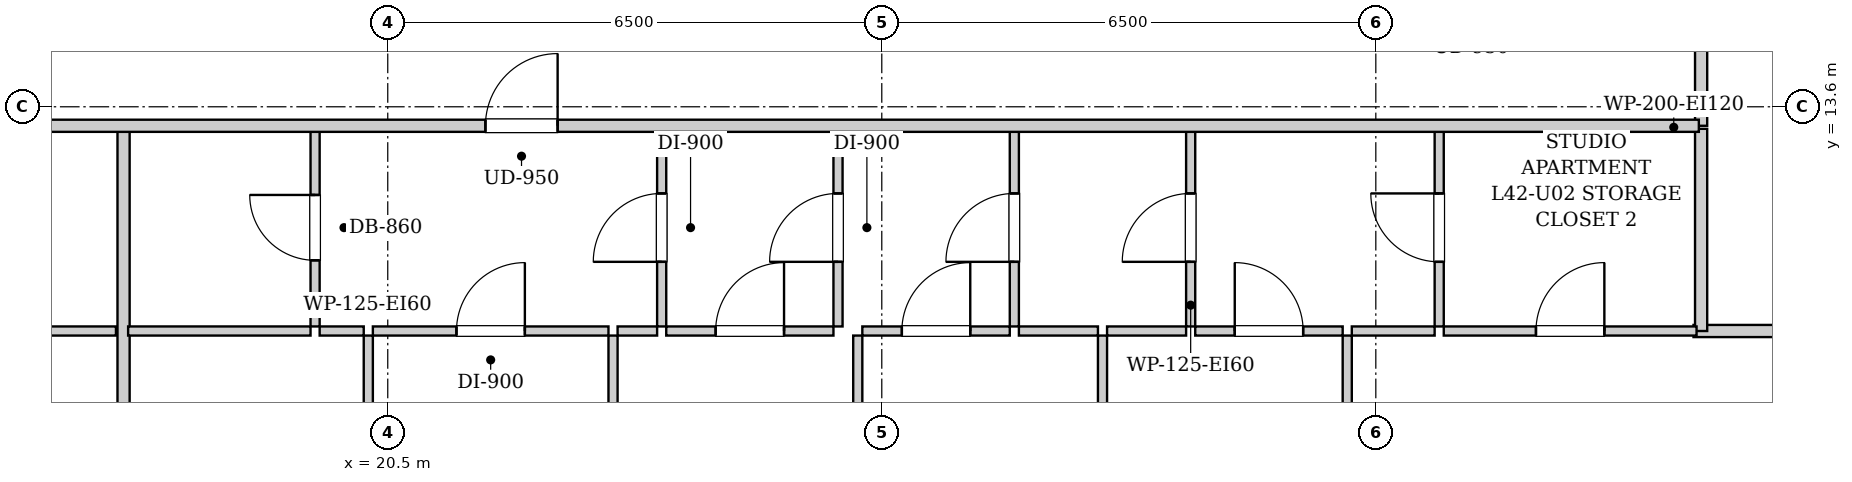
"""IFC4 building model, lengths in metres.
Left out: names, types, materials, properties, quantities, classifications, styles, units other than length and angle.
Written with IfcOpenShell. Run it as: python <this file> out.ifc"""

import sys

from ifc_helpers import new_model, si_unit, direction, frame, frame_2d, origin, place, context, subcontext, project, spatial, rectangle, extrude, element, fill, save


model = new_model("IFC4")
c1 = context("Model", 3, precision=1e-05, world=origin(), true_north=direction((0.0, 1.0)))
c2 = subcontext(c1, "Body", "Model", "MODEL_VIEW")
j1 = project(units=[si_unit("LENGTHUNIT", "METRE"), si_unit("PLANEANGLEUNIT", "RADIAN")], contexts=[c1])
p1 = place(None, origin())
s1 = spatial("IfcSite", under=j1, at=p1, CompositionType="ELEMENT")
p2 = place(p1, origin())
s2 = spatial("IfcBuilding", under=s1, at=p2, CompositionType="ELEMENT")
p3 = place(p2, frame((0.0, 0.0, 147.15)))
s3 = spatial("IfcBuildingStorey", under=s2, at=p3, CompositionType="ELEMENT", Elevation=147.15)
p4 = place(p3, frame((37.78, 13.35, 0.0), z_axis=(0.0, 0.0, 1.0), x_axis=(0.0, 1.0, 0.0)))
e1 = element("IfcWall", 1, at=p4, inside=s3, PredefinedType="PARTITIONING", context=c2, shape_type="SweptSolid", body=[
    extrude(rectangle(XDim=1.74, YDim=0.16, at=frame_2d((0.87, 0.0))), origin(), (0.0, 0.0, 1.0), 2.99),
])
p5 = place(p3, frame((12.253, 10.65, 0.0), z_axis=(0.0, 0.0, 1.0), x_axis=(1.0, 0.0, 0.0)))
e2 = element("IfcWall", 2, at=p5, inside=s3, PredefinedType="PARTITIONING", context=c2, shape_type="SweptSolid", body=[
    extrude(rectangle(XDim=4.671, YDim=0.12, at=frame_2d((2.335, 0.0))), origin(), (0.0, 0.0, 1.0), 2.99),
])
p6 = place(p5, frame((1.885, 0.0, 0.0)))
e3 = element("IfcOpeningElement", 3, at=p6, cuts=e2, PredefinedType="OPENING", context=c2, shape_type="SweptSolid", body=[
    extrude(rectangle(XDim=0.9, YDim=2.05, at=frame_2d((0.45, 1.025))), frame((0.0, 0.07, 0.0), z_axis=(0.0, -1.0, 0.0), x_axis=(1.0, 0.0, 0.0)), (0.0, 0.0, 1.0), 0.14),
])
p7 = place(p3, frame((37.68, 10.65, 0.0), z_axis=(0.0, 0.0, 1.0), x_axis=(1.0, 0.0, 0.0)))
e4 = element("IfcWall", 4, at=p7, inside=s3, PredefinedType="PARTITIONING", context=c2, shape_type="SweptSolid", body=[
    extrude(rectangle(XDim=2.34, YDim=0.16, at=frame_2d((1.17, 0.0))), origin(), (0.0, 0.0, 1.0), 2.99),
])
p8 = place(p3, frame((37.78, 10.65, 0.0), z_axis=(0.0, 0.0, 1.0), x_axis=(0.0, 1.0, 0.0)))
e5 = element("IfcWall", 5, at=p8, inside=s3, PredefinedType="PARTITIONING", context=c2, shape_type="SweptSolid", body=[
    extrude(rectangle(XDim=2.66, YDim=0.16, at=frame_2d((1.33, 0.0))), origin(), (0.0, 0.0, 1.0), 2.99),
])
p9 = place(p3, frame((17.024, 6.06, 0.0), z_axis=(0.0, 0.0, 1.0), x_axis=(0.0, 1.0, 0.0)))
e6 = element("IfcWall", 6, at=p9, inside=s3, PredefinedType="PARTITIONING", context=c2, shape_type="SweptSolid", body=[
    extrude(rectangle(XDim=7.25, YDim=0.16, at=frame_2d((3.625, 0.0))), origin(), (0.0, 0.0, 1.0), 2.99),
])
p10 = place(p3, frame((19.544, 10.71, 0.0), z_axis=(0.0, 0.0, 1.0), x_axis=(0.0, 1.0, 0.0)))
e7 = element("IfcWall", 7, at=p10, inside=s3, PredefinedType="PARTITIONING", context=c2, shape_type="SweptSolid", body=[
    extrude(rectangle(XDim=2.6, YDim=0.12, at=frame_2d((1.3, 0.0))), origin(), (0.0, 0.0, 1.0), 2.99),
])
p11 = place(p10, frame((0.87, 0.0, 0.0)))
e8 = element("IfcOpeningElement", 8, at=p11, cuts=e7, PredefinedType="OPENING", context=c2, shape_type="SweptSolid", body=[
    extrude(rectangle(XDim=0.86, YDim=2.05, at=frame_2d((0.43, 1.025))), frame((0.0, 0.07, 0.0), z_axis=(0.0, -1.0, 0.0), x_axis=(1.0, 0.0, 0.0)), (0.0, 0.0, 1.0), 0.14),
])
p12 = place(p3, frame((17.084, 10.65, 0.0), z_axis=(0.0, 0.0, 1.0), x_axis=(1.0, 0.0, 0.0)))
e9 = element("IfcWall", 9, at=p12, inside=s3, PredefinedType="PARTITIONING", context=c2, shape_type="SweptSolid", body=[
    extrude(rectangle(XDim=2.4, YDim=0.12, at=frame_2d((1.2, 0.0))), origin(), (0.0, 0.0, 1.0), 2.99),
])
p13 = place(p3, frame((24.104, 10.71, 0.0), z_axis=(0.0, 0.0, 1.0), x_axis=(0.0, 1.0, 0.0)))
e10 = element("IfcWall", 10, at=p13, inside=s3, PredefinedType="PARTITIONING", context=c2, shape_type="SweptSolid", body=[
    extrude(rectangle(XDim=2.6, YDim=0.12, at=frame_2d((1.3, 0.0))), origin(), (0.0, 0.0, 1.0), 2.99),
])
p14 = place(p13, frame((0.85, 0.0, 0.0)))
e11 = element("IfcOpeningElement", 11, at=p14, cuts=e10, PredefinedType="OPENING", context=c2, shape_type="SweptSolid", body=[
    extrude(rectangle(XDim=0.9, YDim=2.05, at=frame_2d((0.45, 1.025))), frame((0.0, 0.07, 0.0), z_axis=(0.0, -1.0, 0.0), x_axis=(1.0, 0.0, 0.0)), (0.0, 0.0, 1.0), 0.14),
])
p15 = place(p3, frame((19.604, 10.65, 0.0), z_axis=(0.0, 0.0, 1.0), x_axis=(1.0, 0.0, 0.0)))
e12 = element("IfcWall", 12, at=p15, inside=s3, PredefinedType="PARTITIONING", context=c2, shape_type="SweptSolid", body=[
    extrude(rectangle(XDim=0.58, YDim=0.12, at=frame_2d((0.29, 0.0))), origin(), (0.0, 0.0, 1.0), 2.99),
])
p16 = place(p3, frame((20.304, 10.65, 0.0), z_axis=(0.0, 0.0, 1.0), x_axis=(1.0, 0.0, 0.0)))
e13 = element("IfcWall", 13, at=p16, inside=s3, PredefinedType="PARTITIONING", context=c2, shape_type="SweptSolid", body=[
    extrude(rectangle(XDim=3.1, YDim=0.12, at=frame_2d((1.55, 0.0))), origin(), (0.0, 0.0, 1.0), 2.99),
])
p17 = place(p16, frame((1.1, 0.0, 0.0)))
e14 = element("IfcOpeningElement", 14, at=p17, cuts=e13, PredefinedType="OPENING", context=c2, shape_type="SweptSolid", body=[
    extrude(rectangle(XDim=0.9, YDim=2.05, at=frame_2d((0.45, 1.025))), frame((0.0, 0.07, 0.0), z_axis=(0.0, -1.0, 0.0), x_axis=(1.0, 0.0, 0.0)), (0.0, 0.0, 1.0), 0.14),
])
p18 = place(p3, frame((23.524, 10.65, 0.0), z_axis=(0.0, 0.0, 1.0), x_axis=(1.0, 0.0, 0.0)))
e15 = element("IfcWall", 15, at=p18, inside=s3, PredefinedType="PARTITIONING", context=c2, shape_type="SweptSolid", body=[
    extrude(rectangle(XDim=0.52, YDim=0.12, at=frame_2d((0.26, 0.0))), origin(), (0.0, 0.0, 1.0), 2.99),
])
p19 = place(p3, frame((26.424, 10.71, 0.0), z_axis=(0.0, 0.0, 1.0), x_axis=(0.0, 1.0, 0.0)))
e16 = element("IfcWall", 16, at=p19, inside=s3, PredefinedType="PARTITIONING", context=c2, shape_type="SweptSolid", body=[
    extrude(rectangle(XDim=2.6, YDim=0.12, at=frame_2d((1.3, 0.0))), origin(), (0.0, 0.0, 1.0), 2.99),
])
p20 = place(p19, frame((0.85, 0.0, 0.0)))
e17 = element("IfcOpeningElement", 17, at=p20, cuts=e16, PredefinedType="OPENING", context=c2, shape_type="SweptSolid", body=[
    extrude(rectangle(XDim=0.9, YDim=2.05, at=frame_2d((0.45, 1.025))), frame((0.0, 0.07, 0.0), z_axis=(0.0, -1.0, 0.0), x_axis=(1.0, 0.0, 0.0)), (0.0, 0.0, 1.0), 0.14),
])
p21 = place(p3, frame((24.164, 10.65, 0.0), z_axis=(0.0, 0.0, 1.0), x_axis=(1.0, 0.0, 0.0)))
e18 = element("IfcWall", 18, at=p21, inside=s3, PredefinedType="PARTITIONING", context=c2, shape_type="SweptSolid", body=[
    extrude(rectangle(XDim=2.2, YDim=0.12, at=frame_2d((1.1, 0.0))), origin(), (0.0, 0.0, 1.0), 2.99),
])
p22 = place(p21, frame((0.65, 0.0, 0.0)))
e19 = element("IfcOpeningElement", 19, at=p22, cuts=e18, PredefinedType="OPENING", context=c2, shape_type="SweptSolid", body=[
    extrude(rectangle(XDim=0.9, YDim=2.05, at=frame_2d((0.45, 1.025))), frame((0.0, 0.07, 0.0), z_axis=(0.0, -1.0, 0.0), x_axis=(1.0, 0.0, 0.0)), (0.0, 0.0, 1.0), 0.14),
])
p23 = place(p3, frame((28.744, 10.71, 0.0), z_axis=(0.0, 0.0, 1.0), x_axis=(0.0, 1.0, 0.0)))
e20 = element("IfcWall", 20, at=p23, inside=s3, PredefinedType="PARTITIONING", context=c2, shape_type="SweptSolid", body=[
    extrude(rectangle(XDim=2.6, YDim=0.12, at=frame_2d((1.3, 0.0))), origin(), (0.0, 0.0, 1.0), 2.99),
])
p24 = place(p23, frame((0.85, 0.0, 0.0)))
e21 = element("IfcOpeningElement", 21, at=p24, cuts=e20, PredefinedType="OPENING", context=c2, shape_type="SweptSolid", body=[
    extrude(rectangle(XDim=0.9, YDim=2.05, at=frame_2d((0.45, 1.025))), frame((0.0, 0.07, 0.0), z_axis=(0.0, -1.0, 0.0), x_axis=(1.0, 0.0, 0.0)), (0.0, 0.0, 1.0), 0.14),
])
p25 = place(p3, frame((26.744, 10.65, 0.0), z_axis=(0.0, 0.0, 1.0), x_axis=(1.0, 0.0, 0.0)))
e22 = element("IfcWall", 22, at=p25, inside=s3, PredefinedType="PARTITIONING", context=c2, shape_type="SweptSolid", body=[
    extrude(rectangle(XDim=1.94, YDim=0.12, at=frame_2d((0.97, 0.0))), origin(), (0.0, 0.0, 1.0), 2.99),
])
p26 = place(p25, frame((0.52, 0.0, 0.0)))
e23 = element("IfcOpeningElement", 23, at=p26, cuts=e22, PredefinedType="OPENING", context=c2, shape_type="SweptSolid", body=[
    extrude(rectangle(XDim=0.9, YDim=2.05, at=frame_2d((0.45, 1.025))), frame((0.0, 0.07, 0.0), z_axis=(0.0, -1.0, 0.0), x_axis=(1.0, 0.0, 0.0)), (0.0, 0.0, 1.0), 0.14),
])
p27 = place(p3, frame((31.064, 10.71, 0.0), z_axis=(0.0, 0.0, 1.0), x_axis=(0.0, 1.0, 0.0)))
e24 = element("IfcWall", 24, at=p27, inside=s3, PredefinedType="PARTITIONING", context=c2, shape_type="SweptSolid", body=[
    extrude(rectangle(XDim=2.6, YDim=0.12, at=frame_2d((1.3, 0.0))), origin(), (0.0, 0.0, 1.0), 2.99),
])
p28 = place(p27, frame((0.85, 0.0, 0.0)))
e25 = element("IfcOpeningElement", 25, at=p28, cuts=e24, PredefinedType="OPENING", context=c2, shape_type="SweptSolid", body=[
    extrude(rectangle(XDim=0.9, YDim=2.05, at=frame_2d((0.45, 1.025))), frame((0.0, 0.07, 0.0), z_axis=(0.0, -1.0, 0.0), x_axis=(1.0, 0.0, 0.0)), (0.0, 0.0, 1.0), 0.14),
])
p29 = place(p3, frame((28.804, 10.65, 0.0), z_axis=(0.0, 0.0, 1.0), x_axis=(1.0, 0.0, 0.0)))
e26 = element("IfcWall", 26, at=p29, inside=s3, PredefinedType="PARTITIONING", context=c2, shape_type="SweptSolid", body=[
    extrude(rectangle(XDim=1.04, YDim=0.12, at=frame_2d((0.52, 0.0))), origin(), (0.0, 0.0, 1.0), 2.99),
])
p30 = place(p3, frame((29.964, 10.65, 0.0), z_axis=(0.0, 0.0, 1.0), x_axis=(1.0, 0.0, 0.0)))
e27 = element("IfcWall", 27, at=p30, inside=s3, PredefinedType="PARTITIONING", context=c2, shape_type="SweptSolid", body=[
    extrude(rectangle(XDim=1.04, YDim=0.12, at=frame_2d((0.52, 0.0))), origin(), (0.0, 0.0, 1.0), 2.99),
])
p31 = place(p3, frame((34.334, 10.71, 0.0), z_axis=(0.0, 0.0, 1.0), x_axis=(0.0, 1.0, 0.0)))
e28 = element("IfcWall", 28, at=p31, inside=s3, PredefinedType="PARTITIONING", context=c2, shape_type="SweptSolid", body=[
    extrude(rectangle(XDim=2.6, YDim=0.12, at=frame_2d((1.3, 0.0))), origin(), (0.0, 0.0, 1.0), 2.99),
])
p32 = place(p31, frame((0.85, 0.0, 0.0)))
e29 = element("IfcOpeningElement", 29, at=p32, cuts=e28, PredefinedType="OPENING", context=c2, shape_type="SweptSolid", body=[
    extrude(rectangle(XDim=0.9, YDim=2.05, at=frame_2d((0.45, 1.025))), frame((0.0, 0.07, 0.0), z_axis=(0.0, -1.0, 0.0), x_axis=(1.0, 0.0, 0.0)), (0.0, 0.0, 1.0), 0.14),
])
p33 = place(p3, frame((31.124, 10.65, 0.0), z_axis=(0.0, 0.0, 1.0), x_axis=(1.0, 0.0, 0.0)))
e30 = element("IfcWall", 30, at=p33, inside=s3, PredefinedType="PARTITIONING", context=c2, shape_type="SweptSolid", body=[
    extrude(rectangle(XDim=1.94, YDim=0.12, at=frame_2d((0.97, 0.0))), origin(), (0.0, 0.0, 1.0), 2.99),
])
p34 = place(p33, frame((0.52, 0.0, 0.0)))
e31 = element("IfcOpeningElement", 31, at=p34, cuts=e30, PredefinedType="OPENING", context=c2, shape_type="SweptSolid", body=[
    extrude(rectangle(XDim=0.9, YDim=2.05, at=frame_2d((0.45, 1.025))), frame((0.0, 0.07, 0.0), z_axis=(0.0, -1.0, 0.0), x_axis=(1.0, 0.0, 0.0)), (0.0, 0.0, 1.0), 0.14),
])
p35 = place(p3, frame((33.184, 10.65, 0.0), z_axis=(0.0, 0.0, 1.0), x_axis=(1.0, 0.0, 0.0)))
e32 = element("IfcWall", 32, at=p35, inside=s3, PredefinedType="PARTITIONING", context=c2, shape_type="SweptSolid", body=[
    extrude(rectangle(XDim=1.09, YDim=0.12, at=frame_2d((0.545, 0.0))), origin(), (0.0, 0.0, 1.0), 2.99),
])
p36 = place(p3, frame((34.394, 10.65, 0.0), z_axis=(0.0, 0.0, 1.0), x_axis=(1.0, 0.0, 0.0)))
e33 = element("IfcWall", 33, at=p36, inside=s3, PredefinedType="PARTITIONING", context=c2, shape_type="SweptSolid", body=[
    extrude(rectangle(XDim=3.326, YDim=0.12, at=frame_2d((1.663, 0.0))), origin(), (0.0, 0.0, 1.0), 2.99),
])
p37 = place(p36, frame((1.213, 0.0, 0.0)))
e34 = element("IfcOpeningElement", 34, at=p37, cuts=e33, PredefinedType="OPENING", context=c2, shape_type="SweptSolid", body=[
    extrude(rectangle(XDim=0.9, YDim=2.05, at=frame_2d((0.45, 1.025))), frame((0.0, 0.07, 0.0), z_axis=(0.0, -1.0, 0.0), x_axis=(1.0, 0.0, 0.0)), (0.0, 0.0, 1.0), 0.14),
])
p38 = place(p3, frame((20.244, 4.08, 0.0), z_axis=(0.0, 0.0, 1.0), x_axis=(0.0, 1.0, 0.0)))
e35 = element("IfcWall", 35, at=p38, inside=s3, PredefinedType="PARTITIONING", context=c2, shape_type="SweptSolid", body=[
    extrude(rectangle(XDim=6.51, YDim=0.12, at=frame_2d((3.255, 0.0))), origin(), (0.0, 0.0, 1.0), 2.99),
])
p39 = place(p38, frame((2.79, 0.0, 0.0)))
e36 = element("IfcOpeningElement", 36, at=p39, cuts=e35, PredefinedType="OPENING", context=c2, shape_type="SweptSolid", body=[
    extrude(rectangle(XDim=0.9, YDim=2.05, at=frame_2d((0.45, 1.025))), frame((0.0, 0.07, 0.0), z_axis=(0.0, -1.0, 0.0), x_axis=(1.0, 0.0, 0.0)), (0.0, 0.0, 1.0), 0.14),
])
p40 = place(p3, frame((23.464, 4.08, 0.0), z_axis=(0.0, 0.0, 1.0), x_axis=(0.0, 1.0, 0.0)))
e37 = element("IfcWall", 37, at=p40, inside=s3, PredefinedType="PARTITIONING", context=c2, shape_type="SweptSolid", body=[
    extrude(rectangle(XDim=6.51, YDim=0.12, at=frame_2d((3.255, 0.0))), origin(), (0.0, 0.0, 1.0), 2.99),
])
p41 = place(p40, frame((2.79, 0.0, 0.0)))
e38 = element("IfcOpeningElement", 38, at=p41, cuts=e37, PredefinedType="OPENING", context=c2, shape_type="SweptSolid", body=[
    extrude(rectangle(XDim=0.9, YDim=2.05, at=frame_2d((0.45, 1.025))), frame((0.0, 0.07, 0.0), z_axis=(0.0, -1.0, 0.0), x_axis=(1.0, 0.0, 0.0)), (0.0, 0.0, 1.0), 0.14),
])
p42 = place(p3, frame((26.684, 4.08, 0.0), z_axis=(0.0, 0.0, 1.0), x_axis=(0.0, 1.0, 0.0)))
e39 = element("IfcWall", 39, at=p42, inside=s3, PredefinedType="PARTITIONING", context=c2, shape_type="SweptSolid", body=[
    extrude(rectangle(XDim=6.51, YDim=0.12, at=frame_2d((3.255, 0.0))), origin(), (0.0, 0.0, 1.0), 2.99),
])
p43 = place(p42, frame((2.79, 0.0, 0.0)))
e40 = element("IfcOpeningElement", 40, at=p43, cuts=e39, PredefinedType="OPENING", context=c2, shape_type="SweptSolid", body=[
    extrude(rectangle(XDim=0.9, YDim=2.05, at=frame_2d((0.45, 1.025))), frame((0.0, 0.07, 0.0), z_axis=(0.0, -1.0, 0.0), x_axis=(1.0, 0.0, 0.0)), (0.0, 0.0, 1.0), 0.14),
])
p44 = place(p3, frame((29.904, 4.08, 0.0), z_axis=(0.0, 0.0, 1.0), x_axis=(0.0, 1.0, 0.0)))
e41 = element("IfcWall", 41, at=p44, inside=s3, PredefinedType="PARTITIONING", context=c2, shape_type="SweptSolid", body=[
    extrude(rectangle(XDim=6.51, YDim=0.12, at=frame_2d((3.255, 0.0))), origin(), (0.0, 0.0, 1.0), 2.99),
])
p45 = place(p44, frame((2.79, 0.0, 0.0)))
e42 = element("IfcOpeningElement", 42, at=p45, cuts=e41, PredefinedType="OPENING", context=c2, shape_type="SweptSolid", body=[
    extrude(rectangle(XDim=0.9, YDim=2.05, at=frame_2d((0.45, 1.025))), frame((0.0, 0.07, 0.0), z_axis=(0.0, -1.0, 0.0), x_axis=(1.0, 0.0, 0.0)), (0.0, 0.0, 1.0), 0.14),
])
p46 = place(p3, frame((33.124, 6.23, 0.0), z_axis=(0.0, 0.0, 1.0), x_axis=(0.0, 1.0, 0.0)))
e43 = element("IfcWall", 43, at=p46, inside=s3, PredefinedType="PARTITIONING", context=c2, shape_type="SweptSolid", body=[
    extrude(rectangle(XDim=4.36, YDim=0.12, at=frame_2d((2.18, 0.0))), origin(), (0.0, 0.0, 1.0), 2.442),
])
p47 = place(p46, frame((1.73, 0.0, 0.0)))
e44 = element("IfcOpeningElement", 44, at=p47, cuts=e43, PredefinedType="OPENING", context=c2, shape_type="SweptSolid", body=[
    extrude(rectangle(XDim=0.9, YDim=2.05, at=frame_2d((0.45, 1.025))), frame((0.0, 0.07, 0.0), z_axis=(0.0, -1.0, 0.0), x_axis=(1.0, 0.0, 0.0)), (0.0, 0.0, 1.0), 0.14),
])
p48 = place(p3, frame((10.05, 13.35, 0.0), z_axis=(0.0, 0.0, 1.0), x_axis=(1.0, 0.0, 0.0)))
e45 = element("IfcWall", 45, at=p48, inside=s3, PredefinedType="PARTITIONING", context=c2, shape_type="SweptSolid", body=[
    extrude(rectangle(XDim=27.7, YDim=0.16, at=frame_2d((13.85, 0.0))), origin(), (0.0, 0.0, 1.0), 2.99),
])
p49 = place(p48, frame((4.063, 0.0, 0.0)))
e46 = element("IfcOpeningElement", 46, at=p49, cuts=e45, PredefinedType="OPENING", context=c2, shape_type="SweptSolid", body=[
    extrude(rectangle(XDim=0.95, YDim=2.1, at=frame_2d((0.475, 1.05))), frame((0.0, 0.09, 0.0), z_axis=(0.0, -1.0, 0.0), x_axis=(1.0, 0.0, 0.0)), (0.0, 0.0, 1.0), 0.18),
])
p50 = place(p48, frame((11.735, 0.0, 0.0)))
e47 = element("IfcOpeningElement", 47, at=p50, cuts=e45, PredefinedType="OPENING", context=c2, shape_type="SweptSolid", body=[
    extrude(rectangle(XDim=0.95, YDim=2.1, at=frame_2d((0.475, 1.05))), frame((0.0, 0.09, 0.0), z_axis=(0.0, -1.0, 0.0), x_axis=(1.0, 0.0, 0.0)), (0.0, 0.0, 1.0), 0.18),
])
p51 = place(p11, origin())
e48 = element("IfcDoor", 48, at=p51, inside=s3, OperationType="SINGLE_SWING_RIGHT", PredefinedType="DOOR", context=c2, shape_type="SweptSolid", body=[
    extrude(rectangle(XDim=0.86, YDim=2.05, at=frame_2d((0.43, 1.025))), frame((0.0, 0.025, 0.0), z_axis=(0.0, -1.0, 0.0), x_axis=(1.0, 0.0, 0.0)), (0.0, 0.0, 1.0), 0.05),
])
fill(e8, e48)
p52 = place(p14, origin())
e49 = element("IfcDoor", 49, at=p52, inside=s3, OperationType="SINGLE_SWING_LEFT", PredefinedType="DOOR", context=c2, shape_type="SweptSolid", body=[
    extrude(rectangle(XDim=0.9, YDim=2.05, at=frame_2d((0.45, 1.025))), frame((0.0, 0.025, 0.0), z_axis=(0.0, -1.0, 0.0), x_axis=(1.0, 0.0, 0.0)), (0.0, 0.0, 1.0), 0.05),
])
fill(e11, e49)
p53 = place(p17, origin())
e50 = element("IfcDoor", 50, at=p53, inside=s3, OperationType="SINGLE_SWING_RIGHT", PredefinedType="DOOR", context=c2, shape_type="SweptSolid", body=[
    extrude(rectangle(XDim=0.9, YDim=2.05, at=frame_2d((0.45, 1.025))), frame((0.0, 0.025, 0.0), z_axis=(0.0, -1.0, 0.0), x_axis=(1.0, 0.0, 0.0)), (0.0, 0.0, 1.0), 0.05),
])
fill(e14, e50)
p54 = place(p20, origin())
e51 = element("IfcDoor", 51, at=p54, inside=s3, OperationType="SINGLE_SWING_LEFT", PredefinedType="DOOR", context=c2, shape_type="SweptSolid", body=[
    extrude(rectangle(XDim=0.9, YDim=2.05, at=frame_2d((0.45, 1.025))), frame((0.0, 0.025, 0.0), z_axis=(0.0, -1.0, 0.0), x_axis=(1.0, 0.0, 0.0)), (0.0, 0.0, 1.0), 0.05),
])
fill(e17, e51)
p55 = place(p22, origin())
e52 = element("IfcDoor", 52, at=p55, inside=s3, OperationType="SINGLE_SWING_RIGHT", PredefinedType="DOOR", context=c2, shape_type="SweptSolid", body=[
    extrude(rectangle(XDim=0.9, YDim=2.05, at=frame_2d((0.45, 1.025))), frame((0.0, 0.025, 0.0), z_axis=(0.0, -1.0, 0.0), x_axis=(1.0, 0.0, 0.0)), (0.0, 0.0, 1.0), 0.05),
])
fill(e19, e52)
p56 = place(p24, origin())
e53 = element("IfcDoor", 53, at=p56, inside=s3, OperationType="SINGLE_SWING_LEFT", PredefinedType="DOOR", context=c2, shape_type="SweptSolid", body=[
    extrude(rectangle(XDim=0.9, YDim=2.05, at=frame_2d((0.45, 1.025))), frame((0.0, 0.025, 0.0), z_axis=(0.0, -1.0, 0.0), x_axis=(1.0, 0.0, 0.0)), (0.0, 0.0, 1.0), 0.05),
])
fill(e21, e53)
p57 = place(p26, origin())
e54 = element("IfcDoor", 54, at=p57, inside=s3, OperationType="SINGLE_SWING_RIGHT", PredefinedType="DOOR", context=c2, shape_type="SweptSolid", body=[
    extrude(rectangle(XDim=0.9, YDim=2.05, at=frame_2d((0.45, 1.025))), frame((0.0, 0.025, 0.0), z_axis=(0.0, -1.0, 0.0), x_axis=(1.0, 0.0, 0.0)), (0.0, 0.0, 1.0), 0.05),
])
fill(e23, e54)
p58 = place(p28, origin())
e55 = element("IfcDoor", 55, at=p58, inside=s3, OperationType="SINGLE_SWING_LEFT", PredefinedType="DOOR", context=c2, shape_type="SweptSolid", body=[
    extrude(rectangle(XDim=0.9, YDim=2.05, at=frame_2d((0.45, 1.025))), frame((0.0, 0.025, 0.0), z_axis=(0.0, -1.0, 0.0), x_axis=(1.0, 0.0, 0.0)), (0.0, 0.0, 1.0), 0.05),
])
fill(e25, e55)
p59 = place(p32, origin())
e56 = element("IfcDoor", 56, at=p59, inside=s3, OperationType="SINGLE_SWING_RIGHT", PredefinedType="DOOR", context=c2, shape_type="SweptSolid", body=[
    extrude(rectangle(XDim=0.9, YDim=2.05, at=frame_2d((0.45, 1.025))), frame((0.0, 0.025, 0.0), z_axis=(0.0, -1.0, 0.0), x_axis=(1.0, 0.0, 0.0)), (0.0, 0.0, 1.0), 0.05),
])
fill(e29, e56)
p60 = place(p34, origin())
e57 = element("IfcDoor", 57, at=p60, inside=s3, OperationType="SINGLE_SWING_LEFT", PredefinedType="DOOR", context=c2, shape_type="SweptSolid", body=[
    extrude(rectangle(XDim=0.9, YDim=2.05, at=frame_2d((0.45, 1.025))), frame((0.0, 0.025, 0.0), z_axis=(0.0, -1.0, 0.0), x_axis=(1.0, 0.0, 0.0)), (0.0, 0.0, 1.0), 0.05),
])
fill(e31, e57)
p61 = place(p37, origin())
e58 = element("IfcDoor", 58, at=p61, inside=s3, OperationType="SINGLE_SWING_RIGHT", PredefinedType="DOOR", context=c2, shape_type="SweptSolid", body=[
    extrude(rectangle(XDim=0.9, YDim=2.05, at=frame_2d((0.45, 1.025))), frame((0.0, 0.025, 0.0), z_axis=(0.0, -1.0, 0.0), x_axis=(1.0, 0.0, 0.0)), (0.0, 0.0, 1.0), 0.05),
])
fill(e34, e58)
p62 = place(p50, origin())
e59 = element("IfcDoor", 59, at=p62, inside=s3, OperationType="SINGLE_SWING_RIGHT", PredefinedType="DOOR", context=c2, shape_type="SweptSolid", body=[
    extrude(rectangle(XDim=0.95, YDim=2.1, at=frame_2d((0.475, 1.05))), frame((0.0, 0.025, 0.0), z_axis=(0.0, -1.0, 0.0), x_axis=(1.0, 0.0, 0.0)), (0.0, 0.0, 1.0), 0.05),
])
fill(e47, e59)
save(model, sys.argv[1])
